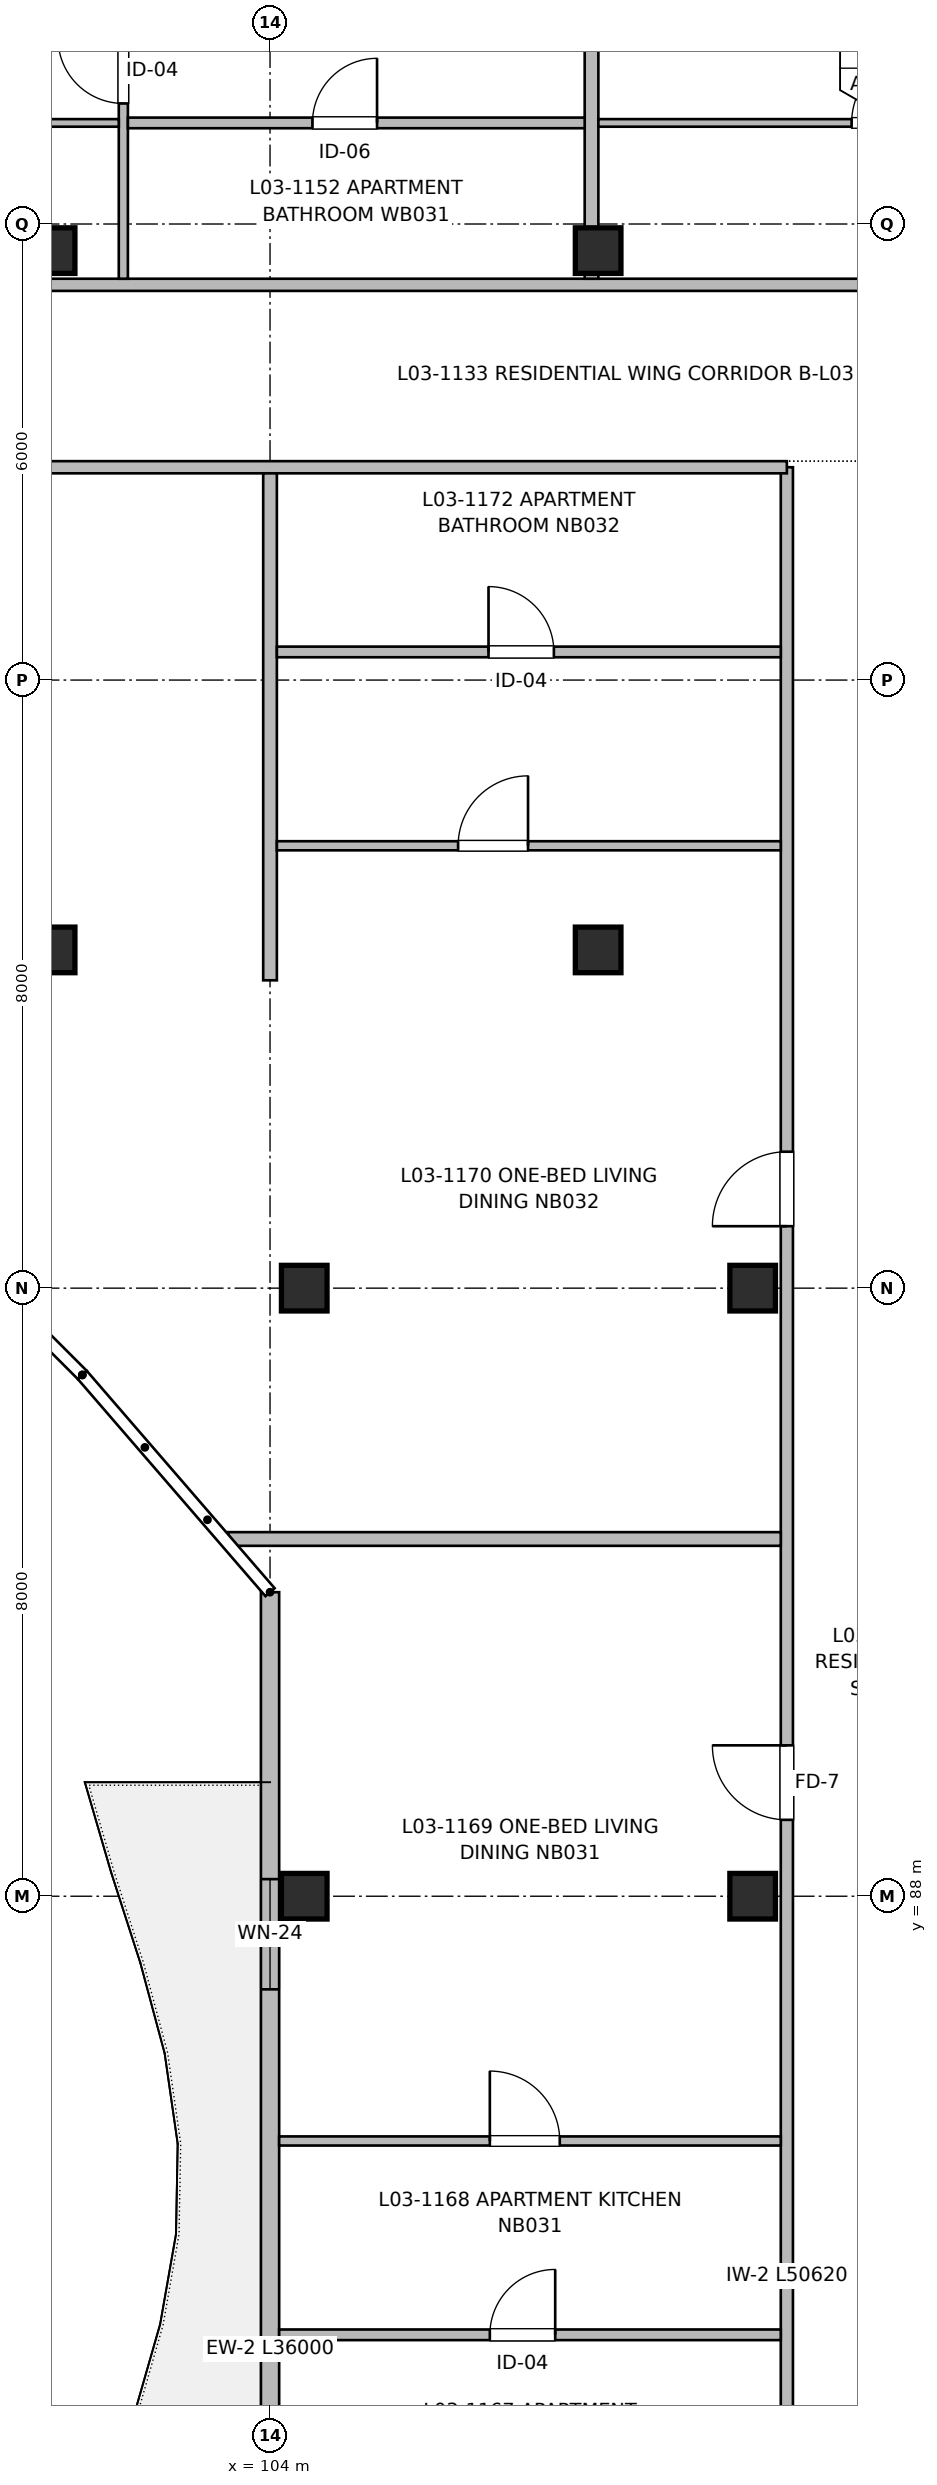
"""IFC4 building model, lengths in metres.
Left out: names, types, materials, properties, quantities, classifications, styles, units other than length and angle.
Written with IfcOpenShell. Run it as: python <this file> out.ifc"""

import sys

from ifc_helpers import new_model, si_unit, direction, frame, frame_2d, origin, origin_2d, place, context, subcontext, project, spatial, rectangle, extrude, element, fill, save


model = new_model("IFC4")
c1 = context("Model", 3, precision=1e-05, world=origin(), true_north=direction((0.0, 1.0)))
c2 = subcontext(c1, "Body", "Model", "MODEL_VIEW")
j1 = project(units=[si_unit("LENGTHUNIT", "METRE"), si_unit("PLANEANGLEUNIT", "RADIAN")], contexts=[c1])
p1 = place(None, origin())
s1 = spatial("IfcSite", under=j1, at=p1, CompositionType="ELEMENT")
p2 = place(p1, origin())
s2 = spatial("IfcBuilding", under=s1, at=p2, CompositionType="ELEMENT")
p3 = place(p2, frame((0.0, 0.0, 10.56)))
s3 = spatial("IfcBuildingStorey", under=s2, at=p3, CompositionType="ELEMENT", Elevation=10.56)
for number, where, z_axis, x_axis in (
    (1, (101.133, 100.45, 0.0), (0.0, 0.0, 1.0), (1.0, 0.0, 0.0)),
    (2, (101.133, 109.65, 0.0), (0.0, 0.0, 1.0), (1.0, 0.0, 0.0)),
    (3, (104.45, 88.0, 0.0), (0.0, 0.0, 1.0), (1.0, 0.0, 0.0)),
    (4, (104.45, 96.0, 0.0), (0.0, 0.0, 1.0), (1.0, 0.0, 0.0)),
    (5, (108.317, 100.45, 0.0), (0.0, 0.0, 1.0), (1.0, 0.0, 0.0)),
    (6, (108.317, 109.65, 0.0), (0.0, 0.0, 1.0), (1.0, 0.0, 0.0)),
    (7, (110.35, 88.0, 0.0), (0.0, 0.0, 1.0), (1.0, 0.0, 0.0)),
    (8, (110.35, 96.0, 0.0), (0.0, 0.0, 1.0), (1.0, 0.0, 0.0)),
):
    element("IfcColumn", number, at=place(p3, frame(where, z_axis=z_axis, x_axis=x_axis)), inside=s3, PredefinedType="COLUMN", context=c2, shape_type="SweptSolid", body=[
        extrude(rectangle(XDim=0.6, YDim=0.6, at=origin_2d()), origin(), (0.0, 0.0, 1.0), 3.2),
    ])
p4 = place(p3, frame((104.0, 56.0, 0.0), z_axis=(0.0, 0.0, 1.0), x_axis=(0.0, 1.0, 0.0)))
e9 = element("IfcWall", 9, at=p4, inside=s3, PredefinedType="SOLIDWALL", context=c2, shape_type="SweptSolid", body=[
    extrude(rectangle(XDim=36.0, YDim=0.24, at=frame_2d((18.0, 0.0))), origin(), (0.0, 0.0, 1.0), 2.98),
])
p5 = place(p4, frame((3.9, 0.0, 0.0)))
e10 = element("IfcOpeningElement", 10, at=p5, cuts=e9, PredefinedType="OPENING", context=c2, shape_type="SweptSolid", body=[
    extrude(rectangle(XDim=1.2, YDim=2.2, at=frame_2d((0.6, 1.1))), frame((0.0, 0.13, 0.0), z_axis=(0.0, -1.0, 0.0), x_axis=(1.0, 0.0, 0.0)), (0.0, 0.0, 1.0), 0.26),
])
p6 = place(p4, frame((5.8, 0.0, 0.72)))
e11 = element("IfcOpeningElement", 11, at=p6, cuts=e9, PredefinedType="OPENING", context=c2, shape_type="SweptSolid", body=[
    extrude(rectangle(XDim=1.8, YDim=1.5, at=frame_2d((0.9, 0.75))), frame((0.0, 0.13, 0.0), z_axis=(0.0, -1.0, 0.0), x_axis=(1.0, 0.0, 0.0)), (0.0, 0.0, 1.0), 0.26),
])
p7 = place(p4, frame((12.65, 0.0, 0.72)))
e12 = element("IfcOpeningElement", 12, at=p7, cuts=e9, PredefinedType="OPENING", context=c2, shape_type="SweptSolid", body=[
    extrude(rectangle(XDim=1.7, YDim=1.5, at=frame_2d((0.85, 0.75))), frame((0.0, 0.13, 0.0), z_axis=(0.0, -1.0, 0.0), x_axis=(1.0, 0.0, 0.0)), (0.0, 0.0, 1.0), 0.26),
])
p8 = place(p4, frame((19.0, 0.0, 0.57)))
e13 = element("IfcOpeningElement", 13, at=p8, cuts=e9, PredefinedType="OPENING", context=c2, shape_type="SweptSolid", body=[
    extrude(rectangle(XDim=2.3, YDim=1.65, at=frame_2d((1.15, 0.825))), frame((0.0, 0.13, 0.0), z_axis=(0.0, -1.0, 0.0), x_axis=(1.0, 0.0, 0.0)), (0.0, 0.0, 1.0), 0.26),
])
p9 = place(p4, frame((30.775, 0.0, 0.77)))
e14 = element("IfcOpeningElement", 14, at=p9, cuts=e9, PredefinedType="OPENING", context=c2, shape_type="SweptSolid", body=[
    extrude(rectangle(XDim=1.45, YDim=1.45, at=frame_2d((0.725, 0.725))), frame((0.0, 0.13, 0.0), z_axis=(0.0, -1.0, 0.0), x_axis=(1.0, 0.0, 0.0)), (0.0, 0.0, 1.0), 0.26),
])
p10 = place(p3, frame((110.8, 56.18, 0.0), z_axis=(0.0, 0.0, 1.0), x_axis=(0.0, 1.0, 0.0)))
e15 = element("IfcWall", 15, at=p10, inside=s3, PredefinedType="PARTITIONING", context=c2, shape_type="SweptSolid", body=[
    extrude(rectangle(XDim=50.62, YDim=0.16, at=frame_2d((25.31, 0.0))), origin(), (0.0, 0.0, 1.0), 2.935),
])
p11 = place(p10, frame((12.82, 0.0, 0.0)))
e16 = element("IfcOpeningElement", 16, at=p11, cuts=e15, PredefinedType="OPENING", context=c2, shape_type="SweptSolid", body=[
    extrude(rectangle(XDim=1.1, YDim=2.15, at=frame_2d((0.55, 1.075))), frame((0.0, 0.09, 0.0), z_axis=(0.0, -1.0, 0.0), x_axis=(1.0, 0.0, 0.0)), (0.0, 0.0, 1.0), 0.18),
])
p12 = place(p10, frame((19.22, 0.0, 0.0)))
e17 = element("IfcOpeningElement", 17, at=p12, cuts=e15, PredefinedType="OPENING", context=c2, shape_type="SweptSolid", body=[
    extrude(rectangle(XDim=1.6, YDim=2.15, at=frame_2d((0.8, 1.075))), frame((0.0, 0.09, 0.0), z_axis=(0.0, -1.0, 0.0), x_axis=(1.0, 0.0, 0.0)), (0.0, 0.0, 1.0), 0.18),
])
p13 = place(p10, frame((1.8, 0.0, 0.0)))
e18 = element("IfcOpeningElement", 18, at=p13, cuts=e15, PredefinedType="OPENING", context=c2, shape_type="SweptSolid", body=[
    extrude(rectangle(XDim=0.96, YDim=2.15, at=frame_2d((0.48, 1.075))), frame((0.0, 0.09, 0.0), z_axis=(0.0, -1.0, 0.0), x_axis=(1.0, 0.0, 0.0)), (0.0, 0.0, 1.0), 0.18),
])
p14 = place(p10, frame((32.825, 0.0, 0.0)))
e19 = element("IfcOpeningElement", 19, at=p14, cuts=e15, PredefinedType="OPENING", context=c2, shape_type="SweptSolid", body=[
    extrude(rectangle(XDim=0.98, YDim=2.15, at=frame_2d((0.49, 1.075))), frame((0.0, 0.09, 0.0), z_axis=(0.0, -1.0, 0.0), x_axis=(1.0, 0.0, 0.0)), (0.0, 0.0, 1.0), 0.18),
])
p15 = place(p10, frame((40.635, 0.0, 0.0)))
e20 = element("IfcOpeningElement", 20, at=p15, cuts=e15, PredefinedType="OPENING", context=c2, shape_type="SweptSolid", body=[
    extrude(rectangle(XDim=0.98, YDim=2.15, at=frame_2d((0.49, 1.075))), frame((0.0, 0.09, 0.0), z_axis=(0.0, -1.0, 0.0), x_axis=(1.0, 0.0, 0.0)), (0.0, 0.0, 1.0), 0.18),
])
p16 = place(p3, frame((93.68, 106.8, 0.0), z_axis=(0.0, 0.0, 1.0), x_axis=(1.0, 0.0, 0.0)))
e21 = element("IfcWall", 21, at=p16, inside=s3, PredefinedType="PARTITIONING", context=c2, shape_type="SweptSolid", body=[
    extrude(rectangle(XDim=17.12, YDim=0.16, at=frame_2d((8.56, 0.0))), origin(), (0.0, 0.0, 1.0), 2.935),
])
p17 = place(p3, frame((93.68, 109.2, 0.0), z_axis=(0.0, 0.0, 1.0), x_axis=(1.0, 0.0, 0.0)))
e22 = element("IfcWall", 22, at=p17, inside=s3, PredefinedType="PARTITIONING", context=c2, shape_type="SweptSolid", body=[
    extrude(rectangle(XDim=43.64, YDim=0.16, at=frame_2d((21.82, 0.0))), origin(), (0.0, 0.0, 1.0), 2.935),
])
p18 = place(p17, frame((3.705, 0.0, 0.0)))
e23 = element("IfcOpeningElement", 23, at=p18, cuts=e22, PredefinedType="OPENING", context=c2, shape_type="SweptSolid", body=[
    extrude(rectangle(XDim=0.98, YDim=2.15, at=frame_2d((0.49, 1.075))), frame((0.0, 0.09, 0.0), z_axis=(0.0, -1.0, 0.0), x_axis=(1.0, 0.0, 0.0)), (0.0, 0.0, 1.0), 0.18),
])
p19 = place(p17, frame((18.315, 0.0, 0.0)))
e24 = element("IfcOpeningElement", 24, at=p19, cuts=e22, PredefinedType="OPENING", context=c2, shape_type="SweptSolid", body=[
    extrude(rectangle(XDim=0.98, YDim=2.15, at=frame_2d((0.49, 1.075))), frame((0.0, 0.09, 0.0), z_axis=(0.0, -1.0, 0.0), x_axis=(1.0, 0.0, 0.0)), (0.0, 0.0, 1.0), 0.18),
])
p20 = place(p17, frame((32.885, 0.0, 0.0)))
e25 = element("IfcOpeningElement", 25, at=p20, cuts=e22, PredefinedType="OPENING", context=c2, shape_type="SweptSolid", body=[
    extrude(rectangle(XDim=0.98, YDim=2.15, at=frame_2d((0.49, 1.075))), frame((0.0, 0.09, 0.0), z_axis=(0.0, -1.0, 0.0), x_axis=(1.0, 0.0, 0.0)), (0.0, 0.0, 1.0), 0.18),
])
p21 = place(p3, frame((104.0, 100.05, 0.0), z_axis=(0.0, 0.0, 1.0), x_axis=(0.0, 1.0, 0.0)))
e26 = element("IfcWall", 26, at=p21, inside=s3, PredefinedType="PARTITIONING", context=c2, shape_type="SweptSolid", body=[
    extrude(rectangle(XDim=6.67, YDim=0.18, at=frame_2d((3.335, 0.0))), origin(), (0.0, 0.0, 1.0), 2.935),
])
p22 = place(p3, frame((108.23, 109.28, 0.0), z_axis=(0.0, 0.0, 1.0), x_axis=(0.0, 1.0, 0.0)))
e27 = element("IfcWall", 27, at=p22, inside=s3, PredefinedType="PARTITIONING", context=c2, shape_type="SweptSolid", body=[
    extrude(rectangle(XDim=6.6, YDim=0.18, at=frame_2d((3.3, 0.0))), origin(), (0.0, 0.0, 1.0), 2.68),
])
p23 = place(p3, frame((102.07, 109.28, 0.0), z_axis=(0.0, 0.0, 1.0), x_axis=(0.0, 1.0, 0.0)))
e28 = element("IfcWall", 28, at=p23, inside=s3, PredefinedType="PARTITIONING", context=c2, shape_type="SweptSolid", body=[
    extrude(rectangle(XDim=6.6, YDim=0.12, at=frame_2d((3.3, 0.0))), origin(), (0.0, 0.0, 1.0), 2.935),
])
p24 = place(p23, frame((2.306, 0.0, 0.0)))
e29 = element("IfcOpeningElement", 29, at=p24, cuts=e28, PredefinedType="OPENING", context=c2, shape_type="SweptSolid", body=[
    extrude(rectangle(XDim=0.86, YDim=2.1, at=frame_2d((0.43, 1.05))), frame((0.0, 0.07, 0.0), z_axis=(0.0, -1.0, 0.0), x_axis=(1.0, 0.0, 0.0)), (0.0, 0.0, 1.0), 0.14),
])
p25 = place(p23, frame((4.097, 0.0, 0.0)))
e30 = element("IfcOpeningElement", 30, at=p25, cuts=e28, PredefinedType="OPENING", context=c2, shape_type="SweptSolid", body=[
    extrude(rectangle(XDim=0.9, YDim=2.1, at=frame_2d((0.45, 1.05))), frame((0.0, 0.07, 0.0), z_axis=(0.0, -1.0, 0.0), x_axis=(1.0, 0.0, 0.0)), (0.0, 0.0, 1.0), 0.14),
])
p26 = place(p3, frame((102.13, 111.33, 0.0), z_axis=(0.0, 0.0, 1.0), x_axis=(1.0, 0.0, 0.0)))
e31 = element("IfcWall", 31, at=p26, inside=s3, PredefinedType="PARTITIONING", context=c2, shape_type="SweptSolid", body=[
    extrude(rectangle(XDim=6.01, YDim=0.14, at=frame_2d((3.005, 0.0))), origin(), (0.0, 0.0, 1.0), 2.935),
])
p27 = place(p26, frame((2.428, 0.0, 0.0)))
e32 = element("IfcOpeningElement", 32, at=p27, cuts=e31, PredefinedType="OPENING", context=c2, shape_type="SweptSolid", body=[
    extrude(rectangle(XDim=0.85, YDim=2.05, at=frame_2d((0.425, 1.025))), frame((0.0, 0.08, 0.0), z_axis=(0.0, -1.0, 0.0), x_axis=(1.0, 0.0, 0.0)), (0.0, 0.0, 1.0), 0.16),
])
p28 = place(p3, frame((93.68, 111.33, 0.0), z_axis=(0.0, 0.0, 1.0), x_axis=(1.0, 0.0, 0.0)))
e33 = element("IfcWall", 33, at=p28, inside=s3, PredefinedType="PARTITIONING", context=c2, shape_type="SweptSolid", body=[
    extrude(rectangle(XDim=8.33, YDim=0.1, at=frame_2d((4.165, 0.0))), origin(), (0.0, 0.0, 1.0), 2.935),
])
p29 = place(p28, frame((3.356, 0.0, 0.0)))
e34 = element("IfcOpeningElement", 34, at=p29, cuts=e33, PredefinedType="OPENING", context=c2, shape_type="SweptSolid", body=[
    extrude(rectangle(XDim=0.92, YDim=2.1, at=frame_2d((0.46, 1.05))), frame((0.0, 0.06, 0.0), z_axis=(0.0, -1.0, 0.0), x_axis=(1.0, 0.0, 0.0)), (0.0, 0.0, 1.0), 0.12),
])
p30 = place(p3, frame((108.32, 111.33, 0.0), z_axis=(0.0, 0.0, 1.0), x_axis=(1.0, 0.0, 0.0)))
e35 = element("IfcWall", 35, at=p30, inside=s3, PredefinedType="PARTITIONING", context=c2, shape_type="SweptSolid", body=[
    extrude(rectangle(XDim=8.27, YDim=0.1, at=frame_2d((4.135, 0.0))), origin(), (0.0, 0.0, 1.0), 2.935),
])
p31 = place(p30, frame((3.332, 0.0, 0.0)))
e36 = element("IfcOpeningElement", 36, at=p31, cuts=e35, PredefinedType="OPENING", context=c2, shape_type="SweptSolid", body=[
    extrude(rectangle(XDim=0.92, YDim=2.1, at=frame_2d((0.46, 1.05))), frame((0.0, 0.06, 0.0), z_axis=(0.0, -1.0, 0.0), x_axis=(1.0, 0.0, 0.0)), (0.0, 0.0, 1.0), 0.12),
])
p32 = place(p3, frame((103.448, 92.7, 0.0), z_axis=(0.0, 0.0, 1.0), x_axis=(1.0, 0.0, 0.0)))
e37 = element("IfcWall", 37, at=p32, inside=s3, PredefinedType="PARTITIONING", context=c2, shape_type="SweptSolid", body=[
    extrude(rectangle(XDim=7.272, YDim=0.18, at=frame_2d((3.636, 0.0))), origin(), (0.0, 0.0, 1.0), 2.935),
])
p33 = place(p3, frame((104.12, 82.23, 0.0), z_axis=(0.0, 0.0, 1.0), x_axis=(1.0, 0.0, 0.0)))
e38 = element("IfcWall", 38, at=p33, inside=s3, PredefinedType="PARTITIONING", context=c2, shape_type="SweptSolid", body=[
    extrude(rectangle(XDim=6.6, YDim=0.14, at=frame_2d((3.3, 0.0))), origin(), (0.0, 0.0, 1.0), 2.935),
])
p34 = place(p33, frame((2.772, 0.0, 0.0)))
e39 = element("IfcOpeningElement", 39, at=p34, cuts=e38, PredefinedType="OPENING", context=c2, shape_type="SweptSolid", body=[
    extrude(rectangle(XDim=0.86, YDim=2.1, at=frame_2d((0.43, 1.05))), frame((0.0, 0.08, 0.0), z_axis=(0.0, -1.0, 0.0), x_axis=(1.0, 0.0, 0.0)), (0.0, 0.0, 1.0), 0.16),
])
p35 = place(p3, frame((104.12, 84.78, 0.0), z_axis=(0.0, 0.0, 1.0), x_axis=(1.0, 0.0, 0.0)))
e40 = element("IfcWall", 40, at=p35, inside=s3, PredefinedType="PARTITIONING", context=c2, shape_type="SweptSolid", body=[
    extrude(rectangle(XDim=6.6, YDim=0.12, at=frame_2d((3.3, 0.0))), origin(), (0.0, 0.0, 1.0), 2.935),
])
p36 = place(p35, frame((2.772, 0.0, 0.0)))
e41 = element("IfcOpeningElement", 41, at=p36, cuts=e40, PredefinedType="OPENING", context=c2, shape_type="SweptSolid", body=[
    extrude(rectangle(XDim=0.92, YDim=2.1, at=frame_2d((0.46, 1.05))), frame((0.0, 0.07, 0.0), z_axis=(0.0, -1.0, 0.0), x_axis=(1.0, 0.0, 0.0)), (0.0, 0.0, 1.0), 0.14),
])
p37 = place(p3, frame((104.09, 101.82, 0.0), z_axis=(0.0, 0.0, 1.0), x_axis=(1.0, 0.0, 0.0)))
e42 = element("IfcWall", 42, at=p37, inside=s3, PredefinedType="PARTITIONING", context=c2, shape_type="SweptSolid", body=[
    extrude(rectangle(XDim=6.63, YDim=0.12, at=frame_2d((3.315, 0.0))), origin(), (0.0, 0.0, 1.0), 2.935),
])
p38 = place(p37, frame((2.385, 0.0, 0.0)))
e43 = element("IfcOpeningElement", 43, at=p38, cuts=e42, PredefinedType="OPENING", context=c2, shape_type="SweptSolid", body=[
    extrude(rectangle(XDim=0.92, YDim=2.1, at=frame_2d((0.46, 1.05))), frame((0.0, 0.07, 0.0), z_axis=(0.0, -1.0, 0.0), x_axis=(1.0, 0.0, 0.0)), (0.0, 0.0, 1.0), 0.14),
])
p39 = place(p3, frame((104.09, 104.37, 0.0), z_axis=(0.0, 0.0, 1.0), x_axis=(1.0, 0.0, 0.0)))
e44 = element("IfcWall", 44, at=p39, inside=s3, PredefinedType="PARTITIONING", context=c2, shape_type="SweptSolid", body=[
    extrude(rectangle(XDim=6.63, YDim=0.14, at=frame_2d((3.315, 0.0))), origin(), (0.0, 0.0, 1.0), 2.935),
])
p40 = place(p39, frame((2.785, 0.0, 0.0)))
e45 = element("IfcOpeningElement", 45, at=p40, cuts=e44, PredefinedType="OPENING", context=c2, shape_type="SweptSolid", body=[
    extrude(rectangle(XDim=0.86, YDim=2.1, at=frame_2d((0.43, 1.05))), frame((0.0, 0.08, 0.0), z_axis=(0.0, -1.0, 0.0), x_axis=(1.0, 0.0, 0.0)), (0.0, 0.0, 1.0), 0.16),
])
p41 = place(p9, origin())
e46 = element("IfcWindow", 46, at=p41, inside=s3, PartitioningType="SINGLE_PANEL", PredefinedType="WINDOW", context=c2, shape_type="SweptSolid", body=[
    extrude(rectangle(XDim=1.45, YDim=1.45, at=frame_2d((0.725, 0.725))), frame((0.0, 0.03, 0.0), z_axis=(0.0, -1.0, 0.0), x_axis=(1.0, 0.0, 0.0)), (0.0, 0.0, 1.0), 0.06),
])
fill(e14, e46)
p42 = place(p24, origin())
e47 = element("IfcDoor", 47, at=p42, inside=s3, OperationType="SINGLE_SWING_RIGHT", PredefinedType="DOOR", context=c2, shape_type="SweptSolid", body=[
    extrude(rectangle(XDim=0.86, YDim=2.1, at=frame_2d((0.43, 1.05))), frame((0.0, 0.025, 0.0), z_axis=(0.0, -1.0, 0.0), x_axis=(1.0, 0.0, 0.0)), (0.0, 0.0, 1.0), 0.05),
])
fill(e29, e47)
p43 = place(p27, origin())
e48 = element("IfcDoor", 48, at=p43, inside=s3, OperationType="SINGLE_SWING_RIGHT", PredefinedType="DOOR", context=c2, shape_type="SweptSolid", body=[
    extrude(rectangle(XDim=0.85, YDim=2.05, at=frame_2d((0.425, 1.025))), frame((0.0, 0.025, 0.0), z_axis=(0.0, -1.0, 0.0), x_axis=(1.0, 0.0, 0.0)), (0.0, 0.0, 1.0), 0.05),
])
fill(e32, e48)
p44 = place(p31, origin())
e49 = element("IfcDoor", 49, at=p44, inside=s3, OperationType="SINGLE_SWING_RIGHT", PredefinedType="DOOR", context=c2, shape_type="SweptSolid", body=[
    extrude(rectangle(XDim=0.92, YDim=2.1, at=frame_2d((0.46, 1.05))), frame((0.0, 0.025, 0.0), z_axis=(0.0, -1.0, 0.0), x_axis=(1.0, 0.0, 0.0)), (0.0, 0.0, 1.0), 0.05),
])
fill(e36, e49)
p45 = place(p34, origin())
e50 = element("IfcDoor", 50, at=p45, inside=s3, OperationType="SINGLE_SWING_RIGHT", PredefinedType="DOOR", context=c2, shape_type="SweptSolid", body=[
    extrude(rectangle(XDim=0.86, YDim=2.1, at=frame_2d((0.43, 1.05))), frame((0.0, 0.025, 0.0), z_axis=(0.0, -1.0, 0.0), x_axis=(1.0, 0.0, 0.0)), (0.0, 0.0, 1.0), 0.05),
])
fill(e39, e50)
p46 = place(p36, origin())
e51 = element("IfcDoor", 51, at=p46, inside=s3, OperationType="SINGLE_SWING_LEFT", PredefinedType="DOOR", context=c2, shape_type="SweptSolid", body=[
    extrude(rectangle(XDim=0.92, YDim=2.1, at=frame_2d((0.46, 1.05))), frame((0.0, 0.025, 0.0), z_axis=(0.0, -1.0, 0.0), x_axis=(1.0, 0.0, 0.0)), (0.0, 0.0, 1.0), 0.05),
])
fill(e41, e51)
p47 = place(p14, origin())
e52 = element("IfcDoor", 52, at=p47, inside=s3, OperationType="SINGLE_SWING_RIGHT", PredefinedType="DOOR", context=c2, shape_type="SweptSolid", body=[
    extrude(rectangle(XDim=0.98, YDim=2.15, at=frame_2d((0.49, 1.075))), frame((0.0, 0.025, 0.0), z_axis=(0.0, -1.0, 0.0), x_axis=(1.0, 0.0, 0.0)), (0.0, 0.0, 1.0), 0.05),
])
fill(e19, e52)
p48 = place(p40, origin())
e53 = element("IfcDoor", 53, at=p48, inside=s3, OperationType="SINGLE_SWING_LEFT", PredefinedType="DOOR", context=c2, shape_type="SweptSolid", body=[
    extrude(rectangle(XDim=0.86, YDim=2.1, at=frame_2d((0.43, 1.05))), frame((0.0, 0.025, 0.0), z_axis=(0.0, -1.0, 0.0), x_axis=(1.0, 0.0, 0.0)), (0.0, 0.0, 1.0), 0.05),
])
fill(e45, e53)
p49 = place(p38, origin())
e54 = element("IfcDoor", 54, at=p49, inside=s3, OperationType="SINGLE_SWING_RIGHT", PredefinedType="DOOR", context=c2, shape_type="SweptSolid", body=[
    extrude(rectangle(XDim=0.92, YDim=2.1, at=frame_2d((0.46, 1.05))), frame((0.0, 0.025, 0.0), z_axis=(0.0, -1.0, 0.0), x_axis=(1.0, 0.0, 0.0)), (0.0, 0.0, 1.0), 0.05),
])
fill(e43, e54)
p50 = place(p15, origin())
e55 = element("IfcDoor", 55, at=p50, inside=s3, OperationType="SINGLE_SWING_LEFT", PredefinedType="DOOR", context=c2, shape_type="SweptSolid", body=[
    extrude(rectangle(XDim=0.98, YDim=2.15, at=frame_2d((0.49, 1.075))), frame((0.0, 0.025, 0.0), z_axis=(0.0, -1.0, 0.0), x_axis=(1.0, 0.0, 0.0)), (0.0, 0.0, 1.0), 0.05),
])
fill(e20, e55)
save(model, sys.argv[1])
